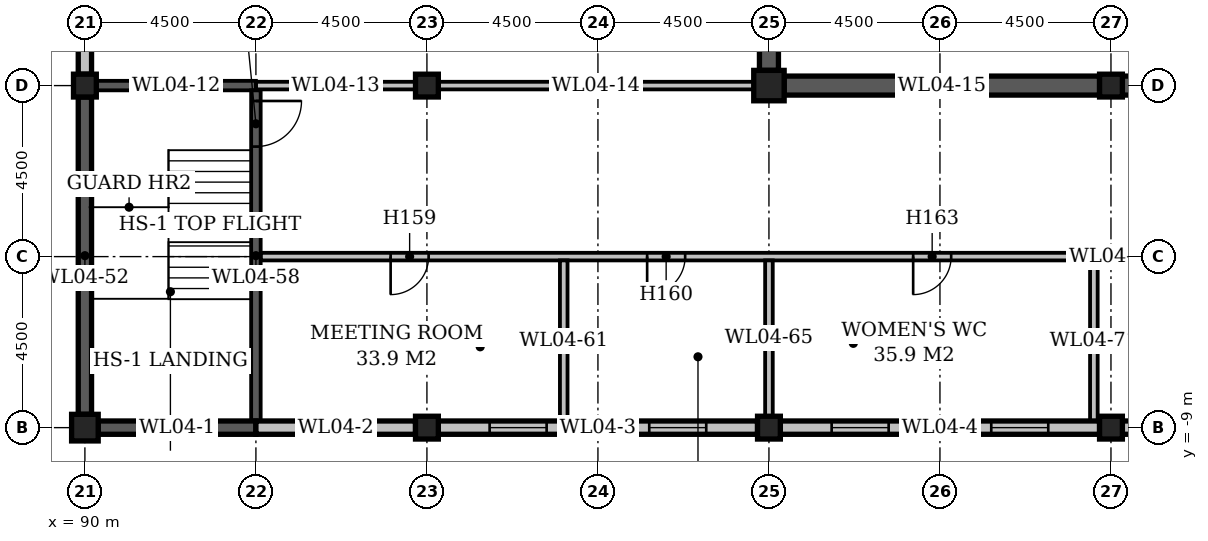
"""IFC4 building model, lengths in metres.
Left out: names, types, materials, properties, quantities, classifications, styles, units other than length and angle.
Written with IfcOpenShell. Run it as: python <this file> out.ifc"""

import sys

from ifc_helpers import new_model, si_unit, direction, frame, frame_2d, origin, origin_2d, place, context, subcontext, project, spatial, rectangle, extrude, element, fill, save


model = new_model("IFC4")
c1 = context("Model", 3, precision=1e-05, world=origin(), true_north=direction((0.0, 1.0)))
c2 = subcontext(c1, "Body", "Model", "MODEL_VIEW")
j1 = project(units=[si_unit("LENGTHUNIT", "METRE"), si_unit("PLANEANGLEUNIT", "RADIAN")], contexts=[c1])
p1 = place(None, origin())
s1 = spatial("IfcSite", under=j1, at=p1, CompositionType="ELEMENT")
p2 = place(p1, origin())
s2 = spatial("IfcBuilding", under=s1, at=p2, CompositionType="ELEMENT")
p3 = place(p2, frame((0.0, 0.0, 24.0)))
s3 = spatial("IfcBuildingStorey", under=s2, at=p3, CompositionType="ELEMENT", Elevation=24.0)
p4 = place(p3, frame((90.0, -9.0, 0.0), z_axis=(0.0, 0.0, 1.0), x_axis=(1.0, 0.0, 0.0)))
e1 = element("IfcColumn", 1, at=p4, inside=s3, PredefinedType="COLUMN", context=c2, shape_type="SweptSolid", body=[
    extrude(rectangle(XDim=0.7, YDim=0.7, at=origin_2d()), origin(), (0.0, 0.0, 1.0), 4.7),
])
for number, where, z_axis, x_axis in (
    (2, (90.0, 0.0, 0.0), (0.0, 0.0, 1.0), (1.0, 0.0, 0.0)),
    (3, (99.0, -9.0, 0.0), (0.0, 0.0, 1.0), (1.0, 0.0, 0.0)),
    (4, (99.0, 0.0, 0.0), (0.0, 0.0, 1.0), (1.0, 0.0, 0.0)),
    (5, (108.0, -9.0, 0.0), (0.0, 0.0, 1.0), (1.0, 0.0, 0.0)),
):
    element("IfcColumn", number, at=place(p3, frame(where, z_axis=z_axis, x_axis=x_axis)), inside=s3, PredefinedType="COLUMN", context=c2, shape_type="SweptSolid", body=[
        extrude(rectangle(XDim=0.6, YDim=0.6, at=origin_2d()), origin(), (0.0, 0.0, 1.0), 4.7),
    ])
p5 = place(p3, frame((108.0, 0.0, -0.3), z_axis=(0.0, 0.0, 1.0), x_axis=(1.0, 0.0, 0.0)))
e6 = element("IfcColumn", 6, at=p5, inside=s3, PredefinedType="COLUMN", context=c2, shape_type="SweptSolid", body=[
    extrude(rectangle(XDim=0.8, YDim=0.8, at=origin_2d()), origin(), (0.0, 0.0, 1.0), 5.0),
])
p6 = place(p3, frame((117.0, -9.0, 0.0), z_axis=(0.0, 0.0, 1.0), x_axis=(1.0, 0.0, 0.0)))
e7 = element("IfcColumn", 7, at=p6, inside=s3, PredefinedType="COLUMN", context=c2, shape_type="SweptSolid", body=[
    extrude(rectangle(XDim=0.6, YDim=0.6, at=origin_2d()), origin(), (0.0, 0.0, 1.0), 4.7),
])
p7 = place(p3, frame((117.0, 0.0, -0.3), z_axis=(0.0, 0.0, 1.0), x_axis=(1.0, 0.0, 0.0)))
e8 = element("IfcColumn", 8, at=p7, inside=s3, PredefinedType="COLUMN", context=c2, shape_type="SweptSolid", body=[
    extrude(rectangle(XDim=0.6, YDim=0.6, at=origin_2d()), origin(), (0.0, 0.0, 1.0), 5.0),
])
p8 = place(p3, frame((90.35, -9.0, 0.0), z_axis=(0.0, 0.0, 1.0), x_axis=(1.0, 0.0, 0.0)))
e9 = element("IfcWall", 9, at=p8, inside=s3, PredefinedType="STANDARD", context=c2, shape_type="SweptSolid", body=[
    extrude(rectangle(XDim=4.15, YDim=0.35, at=frame_2d((2.075, 0.0))), origin(), (0.0, 0.0, 1.0), 4.1),
])
p9 = place(p3, frame((94.5, -9.0, 0.0), z_axis=(0.0, 0.0, 1.0), x_axis=(1.0, 0.0, 0.0)))
e10 = element("IfcWall", 10, at=p9, inside=s3, PredefinedType="STANDARD", context=c2, shape_type="SweptSolid", body=[
    extrude(rectangle(XDim=4.2, YDim=0.35, at=frame_2d((2.1, 0.0))), origin(), (0.0, 0.0, 1.0), 4.1),
])
p10 = place(p9, frame((1.35, 0.0, 1.0)))
e11 = element("IfcOpeningElement", 11, at=p10, cuts=e10, PredefinedType="OPENING", context=c2, shape_type="SweptSolid", body=[
    extrude(rectangle(XDim=1.5, YDim=2.4, at=frame_2d((0.75, 1.2))), frame((0.0, 0.187, 0.0), z_axis=(0.0, -1.0, 0.0), x_axis=(1.0, 0.0, 0.0)), (0.0, 0.0, 1.0), 0.374),
])
p11 = place(p3, frame((99.3, -9.0, 0.0), z_axis=(0.0, 0.0, 1.0), x_axis=(1.0, 0.0, 0.0)))
e12 = element("IfcWall", 12, at=p11, inside=s3, PredefinedType="STANDARD", context=c2, shape_type="SweptSolid", body=[
    extrude(rectangle(XDim=8.4, YDim=0.35, at=frame_2d((4.2, 0.0))), origin(), (0.0, 0.0, 1.0), 4.1),
])
p12 = place(p11, frame((1.35, 0.0, 1.0)))
e13 = element("IfcOpeningElement", 13, at=p12, cuts=e12, PredefinedType="OPENING", context=c2, shape_type="SweptSolid", body=[
    extrude(rectangle(XDim=1.5, YDim=2.4, at=frame_2d((0.75, 1.2))), frame((0.0, 0.187, 0.0), z_axis=(0.0, -1.0, 0.0), x_axis=(1.0, 0.0, 0.0)), (0.0, 0.0, 1.0), 0.374),
])
p13 = place(p11, frame((5.55, 0.0, 1.0)))
e14 = element("IfcOpeningElement", 14, at=p13, cuts=e12, PredefinedType="OPENING", context=c2, shape_type="SweptSolid", body=[
    extrude(rectangle(XDim=1.5, YDim=2.4, at=frame_2d((0.75, 1.2))), frame((0.0, 0.187, 0.0), z_axis=(0.0, -1.0, 0.0), x_axis=(1.0, 0.0, 0.0)), (0.0, 0.0, 1.0), 0.374),
])
p14 = place(p3, frame((108.3, -9.0, 0.0), z_axis=(0.0, 0.0, 1.0), x_axis=(1.0, 0.0, 0.0)))
e15 = element("IfcWall", 15, at=p14, inside=s3, PredefinedType="STANDARD", context=c2, shape_type="SweptSolid", body=[
    extrude(rectangle(XDim=8.4, YDim=0.35, at=frame_2d((4.2, 0.0))), origin(), (0.0, 0.0, 1.0), 4.1),
])
p15 = place(p14, frame((1.35, 0.0, 1.0)))
e16 = element("IfcOpeningElement", 16, at=p15, cuts=e15, PredefinedType="OPENING", context=c2, shape_type="SweptSolid", body=[
    extrude(rectangle(XDim=1.5, YDim=2.4, at=frame_2d((0.75, 1.2))), frame((0.0, 0.187, 0.0), z_axis=(0.0, -1.0, 0.0), x_axis=(1.0, 0.0, 0.0)), (0.0, 0.0, 1.0), 0.374),
])
p16 = place(p14, frame((5.55, 0.0, 1.0)))
e17 = element("IfcOpeningElement", 17, at=p16, cuts=e15, PredefinedType="OPENING", context=c2, shape_type="SweptSolid", body=[
    extrude(rectangle(XDim=1.5, YDim=2.4, at=frame_2d((0.75, 1.2))), frame((0.0, 0.187, 0.0), z_axis=(0.0, -1.0, 0.0), x_axis=(1.0, 0.0, 0.0)), (0.0, 0.0, 1.0), 0.374),
])
p17 = place(p3, frame((117.3, -9.0, 0.0), z_axis=(0.0, 0.0, 1.0), x_axis=(1.0, 0.0, 0.0)))
e18 = element("IfcWall", 18, at=p17, inside=s3, PredefinedType="STANDARD", context=c2, shape_type="SweptSolid", body=[
    extrude(rectangle(XDim=8.4, YDim=0.35, at=frame_2d((4.2, 0.0))), origin(), (0.0, 0.0, 1.0), 4.1),
])
p18 = place(p17, frame((1.35, 0.0, 1.0)))
e19 = element("IfcOpeningElement", 19, at=p18, cuts=e18, PredefinedType="OPENING", context=c2, shape_type="SweptSolid", body=[
    extrude(rectangle(XDim=1.5, YDim=2.4, at=frame_2d((0.75, 1.2))), frame((0.0, 0.187, 0.0), z_axis=(0.0, -1.0, 0.0), x_axis=(1.0, 0.0, 0.0)), (0.0, 0.0, 1.0), 0.374),
])
p19 = place(p17, frame((6.35, 0.0, 1.0)))
e20 = element("IfcOpeningElement", 20, at=p19, cuts=e18, PredefinedType="OPENING", context=c2, shape_type="SweptSolid", body=[
    extrude(rectangle(XDim=1.5, YDim=2.4, at=frame_2d((0.75, 1.2))), frame((0.0, 0.187, 0.0), z_axis=(0.0, -1.0, 0.0), x_axis=(1.0, 0.0, 0.0)), (0.0, 0.0, 1.0), 0.374),
])
p20 = place(p3, frame((94.625, -4.5, 0.0), z_axis=(0.0, 0.0, 1.0), x_axis=(1.0, 0.0, 0.0)))
e21 = element("IfcWall", 21, at=p20, inside=s3, PredefinedType="STANDARD", context=c2, shape_type="SweptSolid", body=[
    extrude(rectangle(XDim=44.875, YDim=0.2, at=frame_2d((22.438, 0.0))), origin(), (0.0, 0.0, 1.0), 4.7),
])
p21 = place(p20, frame((3.42, 0.0, 0.0)))
e22 = element("IfcOpeningElement", 22, at=p21, cuts=e21, PredefinedType="OPENING", context=c2, shape_type="SweptSolid", body=[
    extrude(rectangle(XDim=1.0, YDim=2.1, at=frame_2d((0.5, 1.05))), frame((0.0, 0.112, 0.0), z_axis=(0.0, -1.0, 0.0), x_axis=(1.0, 0.0, 0.0)), (0.0, 0.0, 1.0), 0.224),
])
p22 = place(p20, frame((10.17, 0.0, 0.0)))
e23 = element("IfcOpeningElement", 23, at=p22, cuts=e21, PredefinedType="OPENING", context=c2, shape_type="SweptSolid", body=[
    extrude(rectangle(XDim=1.0, YDim=2.1, at=frame_2d((0.5, 1.05))), frame((0.0, 0.112, 0.0), z_axis=(0.0, -1.0, 0.0), x_axis=(1.0, 0.0, 0.0)), (0.0, 0.0, 1.0), 0.224),
])
p23 = place(p20, frame((17.17, 0.0, 0.0)))
e24 = element("IfcOpeningElement", 24, at=p23, cuts=e21, PredefinedType="OPENING", context=c2, shape_type="SweptSolid", body=[
    extrude(rectangle(XDim=1.0, YDim=2.1, at=frame_2d((0.5, 1.05))), frame((0.0, 0.112, 0.0), z_axis=(0.0, -1.0, 0.0), x_axis=(1.0, 0.0, 0.0)), (0.0, 0.0, 1.0), 0.224),
])
p24 = place(p20, frame((24.82, 0.0, 0.0)))
e25 = element("IfcOpeningElement", 25, at=p24, cuts=e21, PredefinedType="OPENING", context=c2, shape_type="SweptSolid", body=[
    extrude(rectangle(XDim=1.0, YDim=2.1, at=frame_2d((0.5, 1.05))), frame((0.0, 0.112, 0.0), z_axis=(0.0, -1.0, 0.0), x_axis=(1.0, 0.0, 0.0)), (0.0, 0.0, 1.0), 0.224),
])
p25 = place(p20, frame((29.37, 0.0, 0.0)))
e26 = element("IfcOpeningElement", 26, at=p25, cuts=e21, PredefinedType="OPENING", context=c2, shape_type="SweptSolid", body=[
    extrude(rectangle(XDim=1.0, YDim=2.1, at=frame_2d((0.5, 1.05))), frame((0.0, 0.112, 0.0), z_axis=(0.0, -1.0, 0.0), x_axis=(1.0, 0.0, 0.0)), (0.0, 0.0, 1.0), 0.224),
])
p26 = place(p20, frame((33.87, 0.0, 0.0)))
e27 = element("IfcOpeningElement", 27, at=p26, cuts=e21, PredefinedType="OPENING", context=c2, shape_type="SweptSolid", body=[
    extrude(rectangle(XDim=1.0, YDim=2.1, at=frame_2d((0.5, 1.05))), frame((0.0, 0.112, 0.0), z_axis=(0.0, -1.0, 0.0), x_axis=(1.0, 0.0, 0.0)), (0.0, 0.0, 1.0), 0.224),
])
p27 = place(p20, frame((38.52, 0.0, 0.0)))
e28 = element("IfcOpeningElement", 28, at=p27, cuts=e21, PredefinedType="OPENING", context=c2, shape_type="SweptSolid", body=[
    extrude(rectangle(XDim=1.0, YDim=2.1, at=frame_2d((0.5, 1.05))), frame((0.0, 0.112, 0.0), z_axis=(0.0, -1.0, 0.0), x_axis=(1.0, 0.0, 0.0)), (0.0, 0.0, 1.0), 0.224),
])
p28 = place(p3, frame((90.3, 0.0, 0.0), z_axis=(0.0, 0.0, 1.0), x_axis=(1.0, 0.0, 0.0)))
e29 = element("IfcWall", 29, at=p28, inside=s3, PredefinedType="STANDARD", context=c2, shape_type="SweptSolid", body=[
    extrude(rectangle(XDim=4.2, YDim=0.25, at=frame_2d((2.1, 0.0))), origin(), (0.0, 0.0, 1.0), 4.7),
])
p29 = place(p3, frame((94.5, 0.0, 0.0), z_axis=(0.0, 0.0, 1.0), x_axis=(1.0, 0.0, 0.0)))
e30 = element("IfcWall", 30, at=p29, inside=s3, PredefinedType="STANDARD", context=c2, shape_type="SweptSolid", body=[
    extrude(rectangle(XDim=4.2, YDim=0.2, at=frame_2d((2.1, 0.0))), origin(), (0.0, 0.0, 1.0), 4.7),
])
p30 = place(p3, frame((99.3, 0.0, 0.0), z_axis=(0.0, 0.0, 1.0), x_axis=(1.0, 0.0, 0.0)))
e31 = element("IfcWall", 31, at=p30, inside=s3, PredefinedType="STANDARD", context=c2, shape_type="SweptSolid", body=[
    extrude(rectangle(XDim=8.3, YDim=0.2, at=frame_2d((4.15, 0.0))), origin(), (0.0, 0.0, 1.0), 4.7),
])
p31 = place(p3, frame((108.4, 0.0, 0.0), z_axis=(0.0, 0.0, 1.0), x_axis=(1.0, 0.0, 0.0)))
e32 = element("IfcWall", 32, at=p31, inside=s3, PredefinedType="STANDARD", context=c2, shape_type="SweptSolid", body=[
    extrude(rectangle(XDim=8.3, YDim=0.5, at=frame_2d((4.15, 0.0))), origin(), (0.0, 0.0, 1.0), 4.7),
])
p32 = place(p3, frame((117.3, 0.0, 0.0), z_axis=(0.0, 0.0, 1.0), x_axis=(1.0, 0.0, 0.0)))
e33 = element("IfcWall", 33, at=p32, inside=s3, PredefinedType="STANDARD", context=c2, shape_type="SweptSolid", body=[
    extrude(rectangle(XDim=8.4, YDim=0.5, at=frame_2d((4.2, 0.0))), origin(), (0.0, 0.0, 1.0), 4.7),
])
p33 = place(p3, frame((90.0, -8.65, 0.0), z_axis=(0.0, 0.0, 1.0), x_axis=(0.0, 1.0, 0.0)))
e34 = element("IfcWall", 34, at=p33, inside=s3, PredefinedType="STANDARD", context=c2, shape_type="SweptSolid", body=[
    extrude(rectangle(XDim=8.35, YDim=0.35, at=frame_2d((4.175, 0.0))), origin(), (0.0, 0.0, 1.0), 4.1),
])
p34 = place(p3, frame((90.0, 0.3, 0.0), z_axis=(0.0, 0.0, 1.0), x_axis=(0.0, 1.0, 0.0)))
e35 = element("IfcWall", 35, at=p34, inside=s3, PredefinedType="STANDARD", context=c2, shape_type="SweptSolid", body=[
    extrude(rectangle(XDim=8.4, YDim=0.35, at=frame_2d((4.2, 0.0))), origin(), (0.0, 0.0, 1.0), 4.1),
])
p35 = place(p34, frame((1.35, 0.0, 1.0)))
e36 = element("IfcOpeningElement", 36, at=p35, cuts=e35, PredefinedType="OPENING", context=c2, shape_type="SweptSolid", body=[
    extrude(rectangle(XDim=1.5, YDim=2.4, at=frame_2d((0.75, 1.2))), frame((0.0, 0.187, 0.0), z_axis=(0.0, -1.0, 0.0), x_axis=(1.0, 0.0, 0.0)), (0.0, 0.0, 1.0), 0.374),
])
p36 = place(p34, frame((5.55, 0.0, 1.0)))
e37 = element("IfcOpeningElement", 37, at=p36, cuts=e35, PredefinedType="OPENING", context=c2, shape_type="SweptSolid", body=[
    extrude(rectangle(XDim=1.5, YDim=2.4, at=frame_2d((0.75, 1.2))), frame((0.0, 0.187, 0.0), z_axis=(0.0, -1.0, 0.0), x_axis=(1.0, 0.0, 0.0)), (0.0, 0.0, 1.0), 0.374),
])
p37 = place(p3, frame((94.5, -8.825, 0.0), z_axis=(0.0, 0.0, 1.0), x_axis=(0.0, 1.0, 0.0)))
e38 = element("IfcWall", 38, at=p37, inside=s3, PredefinedType="STANDARD", context=c2, shape_type="SweptSolid", body=[
    extrude(rectangle(XDim=8.7, YDim=0.25, at=frame_2d((4.35, 0.0))), origin(), (0.0, 0.0, 1.0), 4.7),
])
p38 = place(p37, frame((7.22, 0.0, 0.0)))
e39 = element("IfcOpeningElement", 39, at=p38, cuts=e38, PredefinedType="OPENING", context=c2, shape_type="SweptSolid", body=[
    extrude(rectangle(XDim=1.2, YDim=2.1, at=frame_2d((0.6, 1.05))), frame((0.0, 0.137, 0.0), z_axis=(0.0, -1.0, 0.0), x_axis=(1.0, 0.0, 0.0)), (0.0, 0.0, 1.0), 0.274),
])
p39 = place(p3, frame((102.6, -8.825, 0.0), z_axis=(0.0, 0.0, 1.0), x_axis=(0.0, 1.0, 0.0)))
e40 = element("IfcWall", 40, at=p39, inside=s3, PredefinedType="STANDARD", context=c2, shape_type="SweptSolid", body=[
    extrude(rectangle(XDim=4.225, YDim=0.2, at=frame_2d((2.112, 0.0))), origin(), (0.0, 0.0, 1.0), 4.7),
])
p40 = place(p3, frame((108.0, -8.7, 0.0), z_axis=(0.0, 0.0, 1.0), x_axis=(0.0, 1.0, 0.0)))
e41 = element("IfcWall", 41, at=p40, inside=s3, PredefinedType="STANDARD", context=c2, shape_type="SweptSolid", body=[
    extrude(rectangle(XDim=4.1, YDim=0.2, at=frame_2d((2.05, 0.0))), origin(), (0.0, 0.0, 1.0), 4.7),
])
p41 = place(p3, frame((108.0, 0.4, 0.0), z_axis=(0.0, 0.0, 1.0), x_axis=(0.0, 1.0, 0.0)))
e42 = element("IfcWall", 42, at=p41, inside=s3, PredefinedType="STANDARD", context=c2, shape_type="SweptSolid", body=[
    extrude(rectangle(XDim=8.2, YDim=0.5, at=frame_2d((4.1, 0.0))), origin(), (0.0, 0.0, 1.0), 4.7),
])
p42 = place(p3, frame((116.55, -8.825, 0.0), z_axis=(0.0, 0.0, 1.0), x_axis=(0.0, 1.0, 0.0)))
e43 = element("IfcWall", 43, at=p42, inside=s3, PredefinedType="STANDARD", context=c2, shape_type="SweptSolid", body=[
    extrude(rectangle(XDim=4.225, YDim=0.2, at=frame_2d((2.112, 0.0))), origin(), (0.0, 0.0, 1.0), 4.7),
])
p43 = place(p3, frame((115.081, 2.304, 0.5), z_axis=(0.0, 0.0, 1.0), x_axis=(0.923880317165, -0.382681538037, 0.0)))
e44 = element("IfcWall", 44, at=p43, inside=s3, PredefinedType="STANDARD", context=c2, shape_type="SweptSolid", body=[
    extrude(rectangle(XDim=3.291, YDim=0.6, at=frame_2d((1.646, 0.0))), origin(), (0.0, 0.0, 1.0), 0.9),
])
p44 = place(p3, frame((89.825, -9.05, 5.0), z_axis=(0.0, 0.0, 1.0), x_axis=(1.0, 0.0, 0.0)))
e45 = element("IfcWall", 45, at=p44, inside=s3, PredefinedType="STANDARD", context=c2, shape_type="SweptSolid", body=[
    extrude(rectangle(XDim=63.35, YDim=0.25, at=frame_2d((31.675, 0.0))), origin(), (0.0, 0.0, 1.0), 1.1),
])
p45 = place(p3, frame((89.95, -8.925, 5.0), z_axis=(0.0, 0.0, 1.0), x_axis=(0.0, 1.0, 0.0)))
e46 = element("IfcWall", 46, at=p45, inside=s3, PredefinedType="STANDARD", context=c2, shape_type="SweptSolid", body=[
    extrude(rectangle(XDim=53.85, YDim=0.25, at=frame_2d((26.925, 0.0))), origin(), (0.0, 0.0, 1.0), 1.1),
])
p46 = place(p38, origin())
e47 = element("IfcDoor", 47, at=p46, inside=s3, OperationType="SINGLE_SWING_RIGHT", PredefinedType="DOOR", context=c2, shape_type="SweptSolid", body=[
    extrude(rectangle(XDim=1.2, YDim=2.1, at=frame_2d((0.6, 1.05))), frame((0.0, 0.025, 0.0), z_axis=(0.0, -1.0, 0.0), x_axis=(1.0, 0.0, 0.0)), (0.0, 0.0, 1.0), 0.05),
])
fill(e39, e47)
p47 = place(p21, frame((1.0, 0.0, 0.0), z_axis=(0.0, 0.0, 1.0), x_axis=(-1.0, 0.0, 0.0)))
e48 = element("IfcDoor", 48, at=p47, inside=s3, OperationType="SINGLE_SWING_RIGHT", PredefinedType="DOOR", context=c2, shape_type="SweptSolid", body=[
    extrude(rectangle(XDim=1.0, YDim=2.1, at=frame_2d((0.5, 1.05))), frame((0.0, 0.025, 0.0), z_axis=(0.0, -1.0, 0.0), x_axis=(1.0, 0.0, 0.0)), (0.0, 0.0, 1.0), 0.05),
])
fill(e22, e48)
p48 = place(p22, frame((1.0, 0.0, 0.0), z_axis=(0.0, 0.0, 1.0), x_axis=(-1.0, 0.0, 0.0)))
e49 = element("IfcDoor", 49, at=p48, inside=s3, OperationType="SINGLE_SWING_RIGHT", PredefinedType="DOOR", context=c2, shape_type="SweptSolid", body=[
    extrude(rectangle(XDim=1.0, YDim=2.1, at=frame_2d((0.5, 1.05))), frame((0.0, 0.025, 0.0), z_axis=(0.0, -1.0, 0.0), x_axis=(1.0, 0.0, 0.0)), (0.0, 0.0, 1.0), 0.05),
])
fill(e23, e49)
p49 = place(p23, frame((1.0, 0.0, 0.0), z_axis=(0.0, 0.0, 1.0), x_axis=(-1.0, 0.0, 0.0)))
e50 = element("IfcDoor", 50, at=p49, inside=s3, OperationType="SINGLE_SWING_RIGHT", PredefinedType="DOOR", context=c2, shape_type="SweptSolid", body=[
    extrude(rectangle(XDim=1.0, YDim=2.1, at=frame_2d((0.5, 1.05))), frame((0.0, 0.025, 0.0), z_axis=(0.0, -1.0, 0.0), x_axis=(1.0, 0.0, 0.0)), (0.0, 0.0, 1.0), 0.05),
])
fill(e24, e50)
p50 = place(p10, origin())
e51 = element("IfcWindow", 51, at=p50, inside=s3, PartitioningType="SINGLE_PANEL", PredefinedType="WINDOW", context=c2, shape_type="SweptSolid", body=[
    extrude(rectangle(XDim=1.5, YDim=2.4, at=frame_2d((0.75, 1.2))), frame((0.0, 0.03, 0.0), z_axis=(0.0, -1.0, 0.0), x_axis=(1.0, 0.0, 0.0)), (0.0, 0.0, 1.0), 0.06),
])
fill(e11, e51)
p51 = place(p12, origin())
e52 = element("IfcWindow", 52, at=p51, inside=s3, PartitioningType="SINGLE_PANEL", PredefinedType="WINDOW", context=c2, shape_type="SweptSolid", body=[
    extrude(rectangle(XDim=1.5, YDim=2.4, at=frame_2d((0.75, 1.2))), frame((0.0, 0.03, 0.0), z_axis=(0.0, -1.0, 0.0), x_axis=(1.0, 0.0, 0.0)), (0.0, 0.0, 1.0), 0.06),
])
fill(e13, e52)
p52 = place(p13, origin())
e53 = element("IfcWindow", 53, at=p52, inside=s3, PartitioningType="SINGLE_PANEL", PredefinedType="WINDOW", context=c2, shape_type="SweptSolid", body=[
    extrude(rectangle(XDim=1.5, YDim=2.4, at=frame_2d((0.75, 1.2))), frame((0.0, 0.03, 0.0), z_axis=(0.0, -1.0, 0.0), x_axis=(1.0, 0.0, 0.0)), (0.0, 0.0, 1.0), 0.06),
])
fill(e14, e53)
p53 = place(p15, origin())
e54 = element("IfcWindow", 54, at=p53, inside=s3, PartitioningType="SINGLE_PANEL", PredefinedType="WINDOW", context=c2, shape_type="SweptSolid", body=[
    extrude(rectangle(XDim=1.5, YDim=2.4, at=frame_2d((0.75, 1.2))), frame((0.0, 0.03, 0.0), z_axis=(0.0, -1.0, 0.0), x_axis=(1.0, 0.0, 0.0)), (0.0, 0.0, 1.0), 0.06),
])
fill(e16, e54)
p54 = place(p16, origin())
e55 = element("IfcWindow", 55, at=p54, inside=s3, PartitioningType="SINGLE_PANEL", PredefinedType="WINDOW", context=c2, shape_type="SweptSolid", body=[
    extrude(rectangle(XDim=1.5, YDim=2.4, at=frame_2d((0.75, 1.2))), frame((0.0, 0.03, 0.0), z_axis=(0.0, -1.0, 0.0), x_axis=(1.0, 0.0, 0.0)), (0.0, 0.0, 1.0), 0.06),
])
fill(e17, e55)
save(model, sys.argv[1])
